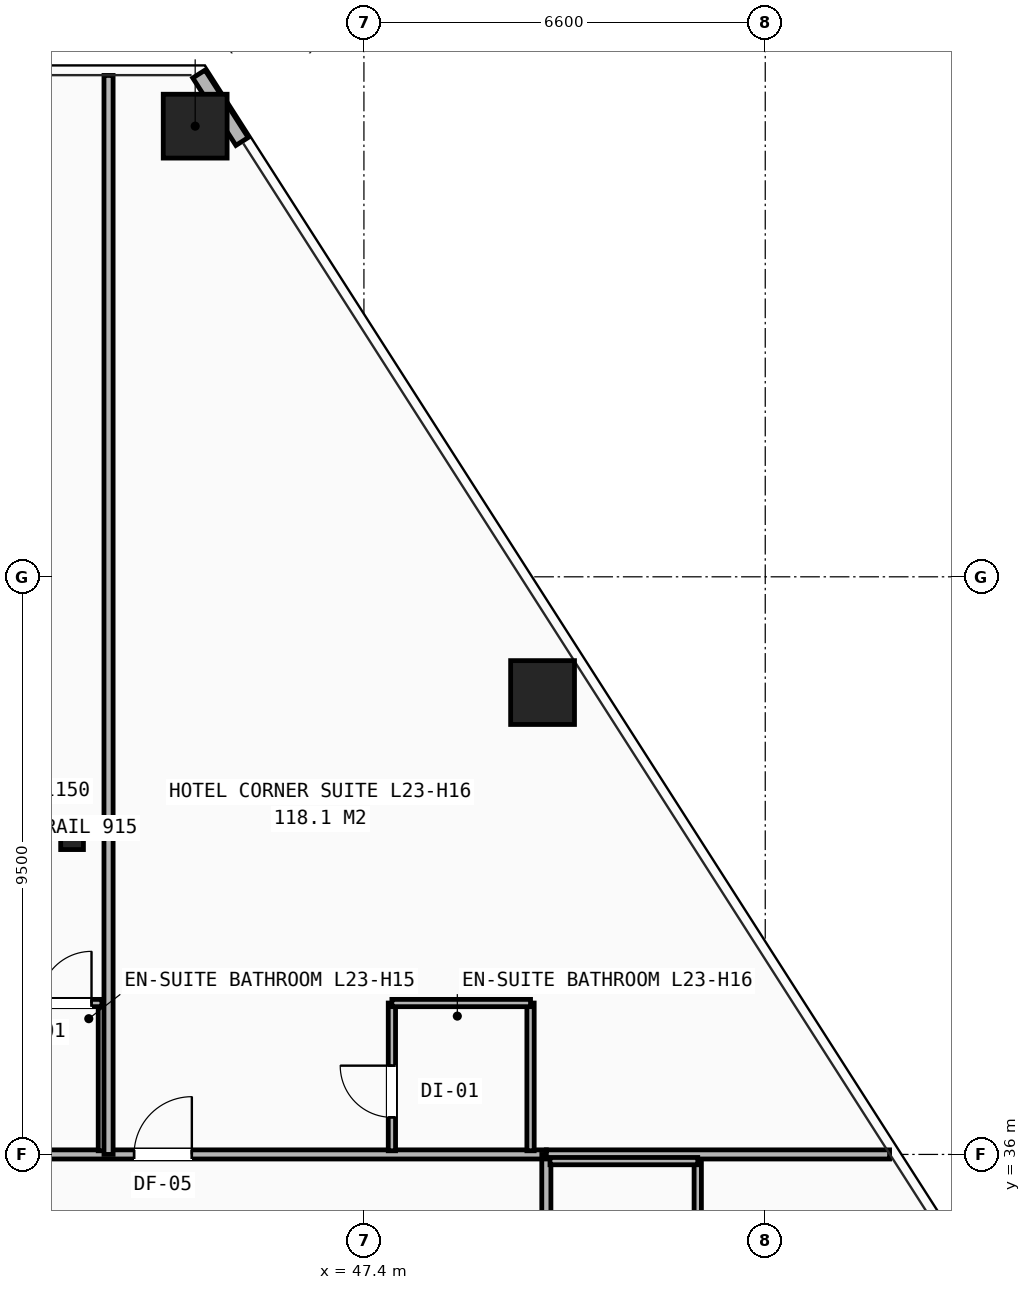
"""IFC4 building model, lengths in metres.
Left out: names, types, materials, properties, quantities, classifications, styles, units other than length and angle.
Written with IfcOpenShell. Run it as: python <this file> out.ifc"""

import sys

from ifc_helpers import new_model, si_unit, direction, frame, frame_2d, origin, origin_2d, place, context, subcontext, project, spatial, rectangle, hollow_rectangle, i_section, extrude, element, fill, save


model = new_model("IFC4")
c1 = context("Model", 3, precision=1e-05, world=origin(), true_north=direction((0.0, 1.0)))
c2 = subcontext(c1, "Body", "Model", "MODEL_VIEW")
j1 = project(units=[si_unit("LENGTHUNIT", "METRE"), si_unit("PLANEANGLEUNIT", "RADIAN")], contexts=[c1])
p1 = place(None, origin())
s1 = spatial("IfcSite", under=j1, at=p1, CompositionType="ELEMENT")
p2 = place(p1, origin())
s2 = spatial("IfcBuilding", under=s1, at=p2, CompositionType="ELEMENT")
p3 = place(p2, frame((0.0, 0.0, 83.0)))
s3 = spatial("IfcBuildingStorey", under=s2, at=p3, CompositionType="ELEMENT", Elevation=83.0)
p4 = place(p3, frame((42.6, 41.2, 0.0), z_axis=(0.0, 0.0, 1.0), x_axis=(1.0, 0.0, 0.0)))
e1 = element("IfcColumn", 1, at=p4, inside=s3, PredefinedType="COLUMN", context=c2, shape_type="SweptSolid", body=[
    extrude(i_section(OverallWidth=0.374, OverallDepth=0.372, WebThickness=0.016, FlangeThickness=0.026, at=origin_2d()), origin(), (0.0, 0.0, 1.0), 3.2),
])
for number, where, z_axis, x_axis in (
    (2, (44.625, 52.912, 0.0), (0.0, 0.0, 1.0), (1.0, 0.0, 0.0)),
    (3, (50.338, 43.596, 0.0), (0.0, 0.0, 1.0), (1.0, 0.0, 0.0)),
):
    element("IfcColumn", number, at=place(p3, frame(where, z_axis=z_axis, x_axis=x_axis)), inside=s3, PredefinedType="COLUMN", context=c2, shape_type="SweptSolid", body=[
        extrude(hollow_rectangle(XDim=1.05, YDim=1.05, WallThickness=0.07, at=origin_2d()), origin(), (0.0, 0.0, 1.0), 3.2),
    ])
p5 = place(p3, frame((45.396, 52.66, 0.0), z_axis=(0.0, 0.0, 1.0), x_axis=(-0.538937912301, 0.842345491283, 0.0)))
e4 = element("IfcWall", 4, at=p5, inside=s3, PredefinedType="SHEAR", context=c2, shape_type="SweptSolid", body=[
    extrude(rectangle(XDim=1.316, YDim=0.24, at=frame_2d((0.658, 0.0))), origin(), (0.0, 0.0, 1.0), 2.253),
])
p6 = place(p3, frame((40.75, 36.0, 0.0), z_axis=(0.0, 0.0, 1.0), x_axis=(1.0, 0.0, 0.0)))
e5 = element("IfcWall", 5, at=p6, inside=s3, PredefinedType="PARTITIONING", context=c2, shape_type="SweptSolid", body=[
    extrude(rectangle(XDim=9.65, YDim=0.15, at=frame_2d((4.825, 0.0))), origin(), (0.0, 0.0, 1.0), 2.503),
])
p7 = place(p6, frame((2.87, 0.0, 0.0)))
e6 = element("IfcOpeningElement", 6, at=p7, cuts=e5, PredefinedType="OPENING", context=c2, shape_type="SweptSolid", body=[
    extrude(rectangle(XDim=0.95, YDim=2.1, at=frame_2d((0.475, 1.05))), frame((0.0, 0.085, 0.0), z_axis=(0.0, -1.0, 0.0), x_axis=(1.0, 0.0, 0.0)), (0.0, 0.0, 1.0), 0.17),
])
p8 = place(p3, frame((50.4, 14.1, 0.0), z_axis=(0.0, 0.0, 1.0), x_axis=(0.0, 1.0, 0.0)))
e7 = element("IfcWall", 7, at=p8, inside=s3, PredefinedType="PARTITIONING", context=c2, shape_type="SweptSolid", body=[
    extrude(rectangle(XDim=21.9, YDim=0.15, at=frame_2d((10.95, 0.0))), origin(), (0.0, 0.0, 1.0), 2.421),
])
p9 = place(p8, frame((0.42, 0.0, 0.0)))
e8 = element("IfcOpeningElement", 8, at=p9, cuts=e7, PredefinedType="OPENING", context=c2, shape_type="SweptSolid", body=[
    extrude(rectangle(XDim=0.95, YDim=2.1, at=frame_2d((0.475, 1.05))), frame((0.0, 0.085, 0.0), z_axis=(0.0, -1.0, 0.0), x_axis=(1.0, 0.0, 0.0)), (0.0, 0.0, 1.0), 0.17),
])
p10 = place(p8, frame((4.72, 0.0, 0.0)))
e9 = element("IfcOpeningElement", 9, at=p10, cuts=e7, PredefinedType="OPENING", context=c2, shape_type="SweptSolid", body=[
    extrude(rectangle(XDim=0.95, YDim=2.1, at=frame_2d((0.475, 1.05))), frame((0.0, 0.085, 0.0), z_axis=(0.0, -1.0, 0.0), x_axis=(1.0, 0.0, 0.0)), (0.0, 0.0, 1.0), 0.17),
])
p11 = place(p8, frame((9.12, 0.0, 0.0)))
e10 = element("IfcOpeningElement", 10, at=p11, cuts=e7, PredefinedType="OPENING", context=c2, shape_type="SweptSolid", body=[
    extrude(rectangle(XDim=0.95, YDim=2.1, at=frame_2d((0.475, 1.05))), frame((0.0, 0.085, 0.0), z_axis=(0.0, -1.0, 0.0), x_axis=(1.0, 0.0, 0.0)), (0.0, 0.0, 1.0), 0.17),
])
p12 = place(p8, frame((13.72, 0.0, 0.0)))
e11 = element("IfcOpeningElement", 11, at=p12, cuts=e7, PredefinedType="OPENING", context=c2, shape_type="SweptSolid", body=[
    extrude(rectangle(XDim=0.95, YDim=2.1, at=frame_2d((0.475, 1.05))), frame((0.0, 0.085, 0.0), z_axis=(0.0, -1.0, 0.0), x_axis=(1.0, 0.0, 0.0)), (0.0, 0.0, 1.0), 0.17),
])
p13 = place(p8, frame((18.12, 0.0, 0.0)))
e12 = element("IfcOpeningElement", 12, at=p13, cuts=e7, PredefinedType="OPENING", context=c2, shape_type="SweptSolid", body=[
    extrude(rectangle(XDim=0.95, YDim=2.1, at=frame_2d((0.475, 1.05))), frame((0.0, 0.085, 0.0), z_axis=(0.0, -1.0, 0.0), x_axis=(1.0, 0.0, 0.0)), (0.0, 0.0, 1.0), 0.17),
])
p14 = place(p3, frame((50.4, 36.0, 0.0), z_axis=(0.0, 0.0, 1.0), x_axis=(1.0, 0.0, 0.0)))
e13 = element("IfcWall", 13, at=p14, inside=s3, PredefinedType="PARTITIONING", context=c2, shape_type="SweptSolid", body=[
    extrude(rectangle(XDim=5.645, YDim=0.15, at=frame_2d((2.823, 0.0))), origin(), (0.0, 0.0, 1.0), 2.258),
])
p15 = place(p3, frame((52.89, 33.61, 0.0), z_axis=(0.0, 0.0, 1.0), x_axis=(0.0, 1.0, 0.0)))
e14 = element("IfcWall", 14, at=p15, inside=s3, PredefinedType="PARTITIONING", context=c2, shape_type="SweptSolid", body=[
    extrude(rectangle(XDim=2.28, YDim=0.12, at=frame_2d((1.14, 0.0))), origin(), (0.0, 0.0, 1.0), 2.97),
])
for number, where, z_axis, x_axis in (
    (15, (50.46, 35.89, 0.0), (0.0, 0.0, 1.0), (1.0, 0.0, 0.0)),
    (16, (43.09, 36.06, 0.0), (0.0, 0.0, 1.0), (0.0, 1.0, 0.0)),
):
    element("IfcWall", number, at=place(p3, frame(where, z_axis=z_axis, x_axis=x_axis)), inside=s3, PredefinedType="PARTITIONING", context=c2, shape_type="SweptSolid", body=[
        extrude(rectangle(XDim=2.43, YDim=0.12, at=frame_2d((1.215, 0.0))), origin(), (0.0, 0.0, 1.0), 2.97),
    ])
p16 = place(p3, frame((41.95, 38.49, 0.0), z_axis=(0.0, 0.0, 1.0), x_axis=(1.0, 0.0, 0.0)))
e17 = element("IfcWall", 17, at=p16, inside=s3, PredefinedType="PARTITIONING", context=c2, shape_type="SweptSolid", body=[
    extrude(rectangle(XDim=1.14, YDim=0.12, at=frame_2d((0.57, 0.0))), origin(), (0.0, 0.0, 1.0), 2.97),
])
p17 = place(p16, frame((0.12, 0.0, 0.0)))
e18 = element("IfcOpeningElement", 18, at=p17, cuts=e17, PredefinedType="OPENING", context=c2, shape_type="SweptSolid", body=[
    extrude(rectangle(XDim=0.85, YDim=2.05, at=frame_2d((0.425, 1.025))), frame((0.0, 0.07, 0.0), z_axis=(0.0, -1.0, 0.0), x_axis=(1.0, 0.0, 0.0)), (0.0, 0.0, 1.0), 0.14),
])
p18 = place(p3, frame((43.2, 36.0, 0.0), z_axis=(0.0, 0.0, 1.0), x_axis=(0.0, 1.0, 0.0)))
e19 = element("IfcWall", 19, at=p18, inside=s3, PredefinedType="PARTITIONING", context=c2, shape_type="SweptSolid", body=[
    extrude(rectangle(XDim=17.746, YDim=0.15, at=frame_2d((8.873, 0.0))), origin(), (0.0, 0.0, 1.0), 2.258),
])
p19 = place(p3, frame((47.86, 36.06, 0.0), z_axis=(0.0, 0.0, 1.0), x_axis=(0.0, 1.0, 0.0)))
e20 = element("IfcWall", 20, at=p19, inside=s3, PredefinedType="PARTITIONING", context=c2, shape_type="SweptSolid", body=[
    extrude(rectangle(XDim=2.43, YDim=0.12, at=frame_2d((1.215, 0.0))), origin(), (0.0, 0.0, 1.0), 2.503),
])
p20 = place(p19, frame((0.55, 0.0, 0.0)))
e21 = element("IfcOpeningElement", 21, at=p20, cuts=e20, PredefinedType="OPENING", context=c2, shape_type="SweptSolid", body=[
    extrude(rectangle(XDim=0.85, YDim=2.05, at=frame_2d((0.425, 1.025))), frame((0.0, 0.07, 0.0), z_axis=(0.0, -1.0, 0.0), x_axis=(1.0, 0.0, 0.0)), (0.0, 0.0, 1.0), 0.14),
])
p21 = place(p3, frame((50.14, 36.06, 0.0), z_axis=(0.0, 0.0, 1.0), x_axis=(0.0, 1.0, 0.0)))
e22 = element("IfcWall", 22, at=p21, inside=s3, PredefinedType="PARTITIONING", context=c2, shape_type="SweptSolid", body=[
    extrude(rectangle(XDim=2.43, YDim=0.12, at=frame_2d((1.215, 0.0))), origin(), (0.0, 0.0, 1.0), 2.97),
])
p22 = place(p3, frame((47.86, 38.49, 0.0), z_axis=(0.0, 0.0, 1.0), x_axis=(1.0, 0.0, 0.0)))
e23 = element("IfcWall", 23, at=p22, inside=s3, PredefinedType="PARTITIONING", context=c2, shape_type="SweptSolid", body=[
    extrude(rectangle(XDim=2.28, YDim=0.12, at=frame_2d((1.14, 0.0))), origin(), (0.0, 0.0, 1.0), 2.503),
])
p23 = place(p17, origin())
e24 = element("IfcDoor", 24, at=p23, inside=s3, OperationType="SINGLE_SWING_RIGHT", PredefinedType="DOOR", context=c2, shape_type="SweptSolid", body=[
    extrude(rectangle(XDim=0.85, YDim=2.05, at=frame_2d((0.425, 1.025))), frame((0.0, 0.025, 0.0), z_axis=(0.0, -1.0, 0.0), x_axis=(1.0, 0.0, 0.0)), (0.0, 0.0, 1.0), 0.05),
])
fill(e18, e24)
p24 = place(p7, origin())
e25 = element("IfcDoor", 25, at=p24, inside=s3, OperationType="SINGLE_SWING_RIGHT", PredefinedType="DOOR", context=c2, shape_type="SweptSolid", body=[
    extrude(rectangle(XDim=0.95, YDim=2.1, at=frame_2d((0.475, 1.05))), frame((0.0, 0.025, 0.0), z_axis=(0.0, -1.0, 0.0), x_axis=(1.0, 0.0, 0.0)), (0.0, 0.0, 1.0), 0.05),
])
fill(e6, e25)
p25 = place(p20, origin())
e26 = element("IfcDoor", 26, at=p25, inside=s3, OperationType="SINGLE_SWING_RIGHT", PredefinedType="DOOR", context=c2, shape_type="SweptSolid", body=[
    extrude(rectangle(XDim=0.85, YDim=2.05, at=frame_2d((0.425, 1.025))), frame((0.0, 0.025, 0.0), z_axis=(0.0, -1.0, 0.0), x_axis=(1.0, 0.0, 0.0)), (0.0, 0.0, 1.0), 0.05),
])
fill(e21, e26)
save(model, sys.argv[1])
